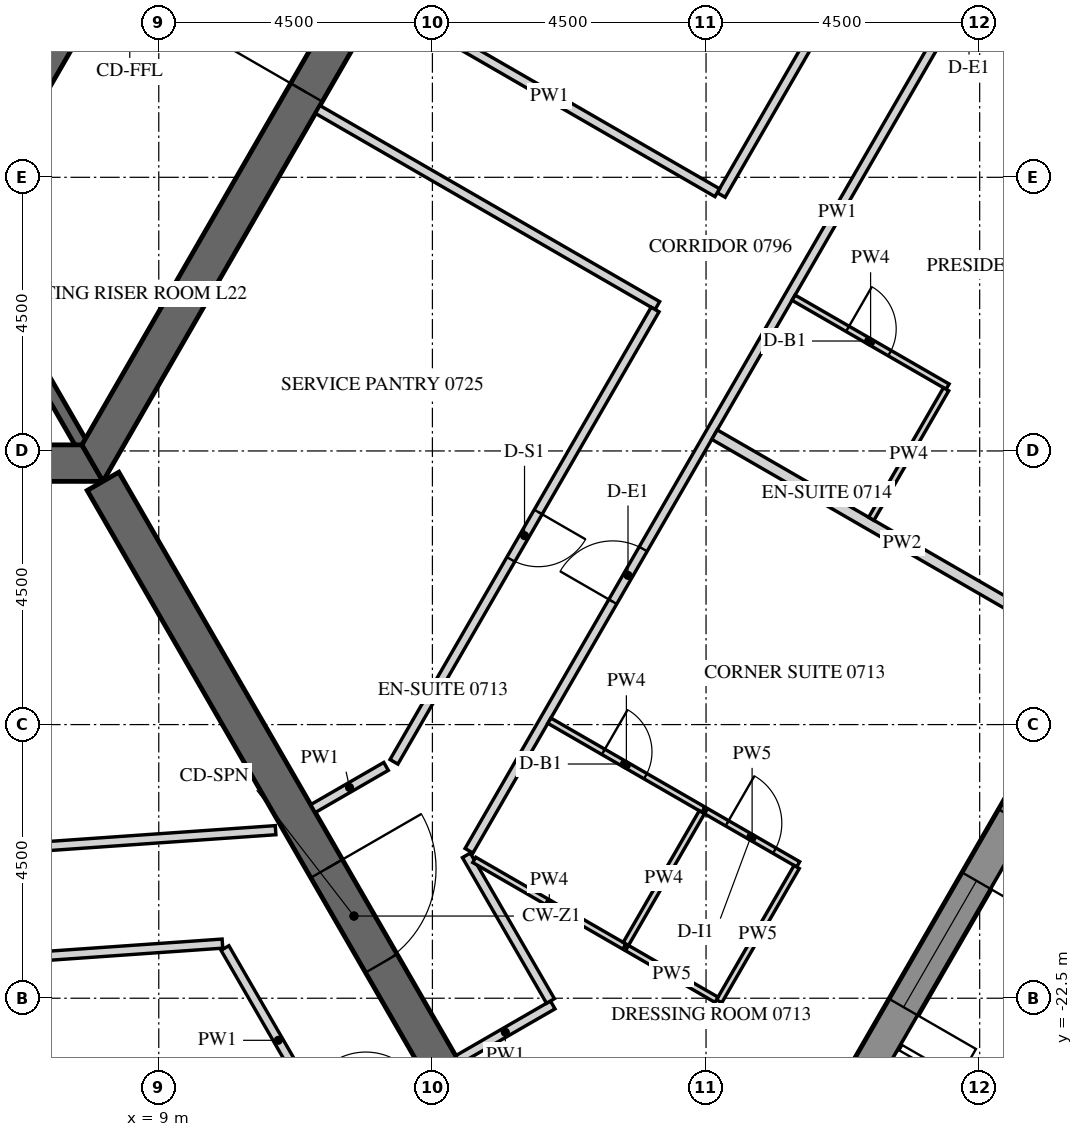
"""IFC4 building model, lengths in metres.
Left out: names, types, materials, properties, quantities, classifications, styles, units other than length and angle.
Written with IfcOpenShell. Run it as: python <this file> out.ifc"""

import sys

from ifc_helpers import new_model, si_unit, direction, frame, frame_2d, origin, place, context, subcontext, project, spatial, polyline, rectangle, outline, extrude, element, fill, save


model = new_model("IFC4")
c1 = context("Model", 3, precision=1e-05, world=origin(), true_north=direction((0.0, 1.0)))
c2 = subcontext(c1, "Body", "Model", "MODEL_VIEW")
j1 = project(units=[si_unit("LENGTHUNIT", "METRE"), si_unit("PLANEANGLEUNIT", "RADIAN")], contexts=[c1])
p1 = place(None, origin())
s1 = spatial("IfcSite", under=j1, at=p1, CompositionType="ELEMENT")
p2 = place(p1, origin())
s2 = spatial("IfcBuilding", under=s1, at=p2, CompositionType="ELEMENT")
p3 = place(p2, frame((0.0, 0.0, 99.9)))
s3 = spatial("IfcBuildingStorey", under=s2, at=p3, CompositionType="ELEMENT", Elevation=99.9)
p4 = place(p3, frame((18.83, -26.835, -0.15), z_axis=(0.0, 0.0, 1.0), x_axis=(0.500003800416, 0.866023209602, 0.0)))
e1 = element("IfcWall", 1, at=p4, inside=s3, PredefinedType="SOLIDWALL", context=c2, shape_type="SweptSolid", body=[
    extrude(outline(polyline([(-0.022, -0.275), (30.097, -0.275), (30.045, 0.275), (0.022, 0.275), (-0.022, -0.275)])), origin(), (0.0, 0.0, 1.0), 3.9),
])
p5 = place(p4, frame((1.236, 0.0, 1.05)))
e2 = element("IfcOpeningElement", 2, at=p5, cuts=e1, PredefinedType="OPENING", context=c2, shape_type="SweptSolid", body=[
    extrude(rectangle(XDim=2.4, YDim=2.4, at=frame_2d((1.2, 1.2))), frame((0.0, 0.285, 0.0), z_axis=(0.0, -1.0, 0.0), x_axis=(1.0, 0.0, 0.0)), (0.0, 0.0, 1.0), 0.57),
])
p6 = place(p4, frame((4.835, 0.0, 1.05)))
e3 = element("IfcOpeningElement", 3, at=p6, cuts=e1, PredefinedType="OPENING", context=c2, shape_type="SweptSolid", body=[
    extrude(rectangle(XDim=2.4, YDim=2.4, at=frame_2d((1.2, 1.2))), frame((0.0, 0.285, 0.0), z_axis=(0.0, -1.0, 0.0), x_axis=(1.0, 0.0, 0.0)), (0.0, 0.0, 1.0), 0.57),
])
p7 = place(p4, frame((8.436, 0.0, 1.05)))
e4 = element("IfcOpeningElement", 4, at=p7, cuts=e1, PredefinedType="OPENING", context=c2, shape_type="SweptSolid", body=[
    extrude(rectangle(XDim=2.4, YDim=2.4, at=frame_2d((1.2, 1.2))), frame((0.0, 0.285, 0.0), z_axis=(0.0, -1.0, 0.0), x_axis=(1.0, 0.0, 0.0)), (0.0, 0.0, 1.0), 0.57),
])
p8 = place(p4, frame((12.035, 0.0, 1.05)))
e5 = element("IfcOpeningElement", 5, at=p8, cuts=e1, PredefinedType="OPENING", context=c2, shape_type="SweptSolid", body=[
    extrude(rectangle(XDim=2.4, YDim=2.4, at=frame_2d((1.2, 1.2))), frame((0.0, 0.285, 0.0), z_axis=(0.0, -1.0, 0.0), x_axis=(1.0, 0.0, 0.0)), (0.0, 0.0, 1.0), 0.57),
])
p9 = place(p4, frame((15.635, 0.0, 1.05)))
e6 = element("IfcOpeningElement", 6, at=p9, cuts=e1, PredefinedType="OPENING", context=c2, shape_type="SweptSolid", body=[
    extrude(rectangle(XDim=2.4, YDim=2.4, at=frame_2d((1.2, 1.2))), frame((0.0, 0.285, 0.0), z_axis=(0.0, -1.0, 0.0), x_axis=(1.0, 0.0, 0.0)), (0.0, 0.0, 1.0), 0.57),
])
p10 = place(p4, frame((19.236, 0.0, 1.05)))
e7 = element("IfcOpeningElement", 7, at=p10, cuts=e1, PredefinedType="OPENING", context=c2, shape_type="SweptSolid", body=[
    extrude(rectangle(XDim=2.4, YDim=2.4, at=frame_2d((1.2, 1.2))), frame((0.0, 0.285, 0.0), z_axis=(0.0, -1.0, 0.0), x_axis=(1.0, 0.0, 0.0)), (0.0, 0.0, 1.0), 0.57),
])
p11 = place(p4, frame((22.835, 0.0, 1.05)))
e8 = element("IfcOpeningElement", 8, at=p11, cuts=e1, PredefinedType="OPENING", context=c2, shape_type="SweptSolid", body=[
    extrude(rectangle(XDim=2.4, YDim=2.4, at=frame_2d((1.2, 1.2))), frame((0.0, 0.285, 0.0), z_axis=(0.0, -1.0, 0.0), x_axis=(1.0, 0.0, 0.0)), (0.0, 0.0, 1.0), 0.57),
])
p12 = place(p4, frame((26.436, 0.0, 1.05)))
e9 = element("IfcOpeningElement", 9, at=p12, cuts=e1, PredefinedType="OPENING", context=c2, shape_type="SweptSolid", body=[
    extrude(rectangle(XDim=2.4, YDim=2.4, at=frame_2d((1.2, 1.2))), frame((0.0, 0.285, 0.0), z_axis=(0.0, -1.0, 0.0), x_axis=(1.0, 0.0, 0.0)), (0.0, 0.0, 1.0), 0.57),
])
p13 = place(p3, frame((-7.91, -13.7, -0.15), z_axis=(0.0, 0.0, 1.0), x_axis=(1.0, 0.0, 0.0)))
e10 = element("IfcWall", 10, at=p13, inside=s3, PredefinedType="SHEAR", context=c2, shape_type="SweptSolid", body=[
    extrude(outline(polyline([(-0.173, -0.3), (15.993, -0.3), (15.646, 0.3), (0.173, 0.3), (-0.173, -0.3)])), origin(), (0.0, 0.0, 1.0), 3.9),
])
p14 = place(p13, frame((7.31, 0.0, 0.15)))
e11 = element("IfcOpeningElement", 11, at=p14, cuts=e10, PredefinedType="OPENING", context=c2, shape_type="SweptSolid", body=[
    extrude(rectangle(XDim=1.2, YDim=2.4, at=frame_2d((0.6, 1.2))), frame((0.0, 0.31, 0.0), z_axis=(0.0, -1.0, 0.0), x_axis=(1.0, 0.0, 0.0)), (0.0, 0.0, 1.0), 0.62),
])
p15 = place(p3, frame((7.91, -13.7, -0.15), z_axis=(0.0, 0.0, 1.0), x_axis=(0.499999880136, 0.866025472988, 0.0)))
e12 = element("IfcWall", 12, at=p15, inside=s3, PredefinedType="SHEAR", context=c2, shape_type="SweptSolid", body=[
    extrude(outline(polyline([(-0.173, -0.3), (15.993, -0.3), (15.646, 0.3), (0.173, 0.3), (-0.173, -0.3)])), origin(), (0.0, 0.0, 1.0), 3.9),
])
p16 = place(p15, frame((7.039, 0.0, 0.15)))
e13 = element("IfcOpeningElement", 13, at=p16, cuts=e12, PredefinedType="OPENING", context=c2, shape_type="SweptSolid", body=[
    extrude(rectangle(XDim=1.8, YDim=2.4, at=frame_2d((0.9, 1.2))), frame((0.0, 0.31, 0.0), z_axis=(0.0, -1.0, 0.0), x_axis=(1.0, 0.0, 0.0)), (0.0, 0.0, 1.0), 0.62),
])
p17 = place(p3, frame((8.083, -14.0, -0.15), z_axis=(0.0, 0.0, 1.0), x_axis=(0.499997680643, -0.866026742862, 0.0)))
e14 = element("IfcWall", 14, at=p17, inside=s3, PredefinedType="SHEAR", context=c2, shape_type="SweptSolid", body=[
    extrude(rectangle(XDim=16.509, YDim=0.6, at=frame_2d((8.254, 0.0))), origin(), (0.0, 0.0, 1.0), 3.9),
])
p18 = place(p17, frame((7.354, 0.0, 0.15)))
e15 = element("IfcOpeningElement", 15, at=p18, cuts=e14, PredefinedType="OPENING", context=c2, shape_type="SweptSolid", body=[
    extrude(rectangle(XDim=1.8, YDim=2.4, at=frame_2d((0.9, 1.2))), frame((0.0, 0.31, 0.0), z_axis=(0.0, -1.0, 0.0), x_axis=(1.0, 0.0, 0.0)), (0.0, 0.0, 1.0), 0.62),
])
p19 = place(p3, frame((5.673, -9.825, -0.15), z_axis=(0.0, 0.0, 1.0), x_axis=(0.499995046907, 0.866028263435, 0.0)))
e16 = element("IfcWall", 16, at=p19, inside=s3, PredefinedType="SHEAR", context=c2, shape_type="SweptSolid", body=[
    extrude(outline(polyline([(-0.101, -0.175), (11.446, -0.175), (11.244, 0.175), (0.101, 0.175), (-0.101, -0.175)])), origin(), (0.0, 0.0, 1.0), 3.9),
])
p20 = place(p19, frame((4.801, 0.0, 0.15)))
e17 = element("IfcOpeningElement", 17, at=p20, cuts=e16, PredefinedType="OPENING", context=c2, shape_type="SweptSolid", body=[
    extrude(rectangle(XDim=1.8, YDim=2.4, at=frame_2d((0.9, 1.2))), frame((0.0, 0.185, 0.0), z_axis=(0.0, -1.0, 0.0), x_axis=(1.0, 0.0, 0.0)), (0.0, 0.0, 1.0), 0.37),
])
p21 = place(p3, frame((5.773, -10.0, -0.15), z_axis=(0.0, 0.0, 1.0), x_axis=(0.500038251005, -0.86600331843, 0.0)))
e18 = element("IfcWall", 18, at=p21, inside=s3, PredefinedType="SHEAR", context=c2, shape_type="SweptSolid", body=[
    extrude(rectangle(XDim=3.926, YDim=0.2, at=frame_2d((1.963, 0.0))), origin(), (0.0, 0.0, 1.0), 3.9),
])
p22 = place(p3, frame((-12.234, -23.16, 0.0), z_axis=(0.0, 0.0, 1.0), x_axis=(0.997563845372, 0.069759403714, 0.0)))
e19 = element("IfcWall", 19, at=p22, inside=s3, PredefinedType="PARTITIONING", context=c2, shape_type="SweptSolid", body=[
    extrude(rectangle(XDim=22.335, YDim=0.15, at=frame_2d((11.168, 0.0))), origin(), (0.0, 0.0, 1.0), 2.988),
])
p23 = place(p22, frame((5.409, 0.0, 0.0)))
e20 = element("IfcOpeningElement", 20, at=p23, cuts=e19, PredefinedType="OPENING", context=c2, shape_type="SweptSolid", body=[
    extrude(rectangle(XDim=1.0, YDim=2.1, at=frame_2d((0.5, 1.05))), frame((0.0, 0.085, 0.0), z_axis=(0.0, -1.0, 0.0), x_axis=(1.0, 0.0, 0.0)), (0.0, 0.0, 1.0), 0.17),
])
p24 = place(p22, frame((18.272, 0.0, 0.0)))
e21 = element("IfcOpeningElement", 21, at=p24, cuts=e19, PredefinedType="OPENING", context=c2, shape_type="SweptSolid", body=[
    extrude(rectangle(XDim=1.0, YDim=2.1, at=frame_2d((0.5, 1.05))), frame((0.0, 0.085, 0.0), z_axis=(0.0, -1.0, 0.0), x_axis=(1.0, 0.0, 0.0)), (0.0, 0.0, 1.0), 0.17),
])
p25 = place(p3, frame((10.089, -21.674, 0.0), z_axis=(0.0, 0.0, 1.0), x_axis=(0.500003763204, -0.866023231087, 0.0)))
e22 = element("IfcWall", 22, at=p25, inside=s3, PredefinedType="PARTITIONING", context=c2, shape_type="SweptSolid", body=[
    extrude(rectangle(XDim=3.506, YDim=0.15, at=frame_2d((1.753, 0.0))), origin(), (0.0, 0.0, 1.0), 2.988),
])
p26 = place(p3, frame((10.921, -19.736, 0.0), z_axis=(0.0, 0.0, 1.0), x_axis=(-0.997564418338, -0.069751209779, 0.0)))
e23 = element("IfcWall", 23, at=p26, inside=s3, PredefinedType="PARTITIONING", context=c2, shape_type="SweptSolid", body=[
    extrude(rectangle(XDim=10.196, YDim=0.15, at=frame_2d((5.098, 0.0))), origin(), (0.0, 0.0, 1.0), 2.988),
])
p27 = place(p26, frame((4.648, 0.0, 0.0)))
e24 = element("IfcOpeningElement", 24, at=p27, cuts=e23, PredefinedType="OPENING", context=c2, shape_type="SweptSolid", body=[
    extrude(rectangle(XDim=0.9, YDim=2.1, at=frame_2d((0.45, 1.05))), frame((0.0, 0.085, 0.0), z_axis=(0.0, -1.0, 0.0), x_axis=(1.0, 0.0, 0.0)), (0.0, 0.0, 1.0), 0.17),
])
p28 = place(p3, frame((13.92, -23.51, 0.0), z_axis=(0.0, 0.0, 1.0), x_axis=(0.866047807691, 0.499961193289, 0.0)))
e25 = element("IfcWall", 25, at=p28, inside=s3, PredefinedType="PARTITIONING", context=c2, shape_type="SweptSolid", body=[
    extrude(rectangle(XDim=1.8, YDim=0.15, at=frame_2d((0.9, 0.0))), origin(), (0.0, 0.0, 1.0), 2.988),
])
p29 = place(p3, frame((15.441, -22.545, 0.0), z_axis=(0.0, 0.0, 1.0), x_axis=(-0.499974611044, 0.866040061609, 0.0)))
e26 = element("IfcWall", 26, at=p29, inside=s3, PredefinedType="PARTITIONING", context=c2, shape_type="SweptSolid", body=[
    extrude(rectangle(XDim=2.766, YDim=0.15, at=frame_2d((1.383, 0.0))), origin(), (0.0, 0.0, 1.0), 2.988),
])
p30 = place(p3, frame((14.102, -20.075, 0.0), z_axis=(0.0, 0.0, 1.0), x_axis=(0.499996816197, 0.866027241946, 0.0)))
e27 = element("IfcWall", 27, at=p30, inside=s3, PredefinedType="PARTITIONING", context=c2, shape_type="SweptSolid", body=[
    extrude(rectangle(XDim=24.238, YDim=0.15, at=frame_2d((12.119, 0.0))), origin(), (0.0, 0.0, 1.0), 2.988),
])
p31 = place(p30, frame((4.729, 0.0, 0.0)))
e28 = element("IfcOpeningElement", 28, at=p31, cuts=e27, PredefinedType="OPENING", context=c2, shape_type="SweptSolid", body=[
    extrude(rectangle(XDim=1.0, YDim=2.1, at=frame_2d((0.5, 1.05))), frame((0.0, 0.085, 0.0), z_axis=(0.0, -1.0, 0.0), x_axis=(1.0, 0.0, 0.0)), (0.0, 0.0, 1.0), 0.17),
])
p32 = place(p30, frame((15.946, 0.0, 0.0)))
e29 = element("IfcOpeningElement", 29, at=p32, cuts=e27, PredefinedType="OPENING", context=c2, shape_type="SweptSolid", body=[
    extrude(rectangle(XDim=1.0, YDim=2.1, at=frame_2d((0.5, 1.05))), frame((0.0, 0.085, 0.0), z_axis=(0.0, -1.0, 0.0), x_axis=(1.0, 0.0, 0.0)), (0.0, 0.0, 1.0), 0.17),
])
p33 = place(p3, frame((24.058, 0.769, 0.0), z_axis=(0.0, 0.0, 1.0), x_axis=(-0.499995346943, -0.866028090212, 0.0)))
e30 = element("IfcWall", 30, at=p33, inside=s3, PredefinedType="PARTITIONING", context=c2, shape_type="SweptSolid", body=[
    extrude(rectangle(XDim=11.616, YDim=0.15, at=frame_2d((5.808, 0.0))), origin(), (0.0, 0.0, 1.0), 2.988),
])
p34 = place(p33, frame((5.358, 0.0, 0.0)))
e31 = element("IfcOpeningElement", 31, at=p34, cuts=e30, PredefinedType="OPENING", context=c2, shape_type="SweptSolid", body=[
    extrude(rectangle(XDim=0.9, YDim=2.1, at=frame_2d((0.45, 1.05))), frame((0.0, 0.085, 0.0), z_axis=(0.0, -1.0, 0.0), x_axis=(1.0, 0.0, 0.0)), (0.0, 0.0, 1.0), 0.17),
])
p35 = place(p3, frame((18.185, -9.253, 0.0), z_axis=(0.0, 0.0, 1.0), x_axis=(-0.866028703517, 0.499994284652, 0.0)))
e32 = element("IfcWall", 32, at=p35, inside=s3, PredefinedType="PARTITIONING", context=c2, shape_type="SweptSolid", body=[
    extrude(rectangle(XDim=6.375, YDim=0.15, at=frame_2d((3.188, 0.0))), origin(), (0.0, 0.0, 1.0), 2.988),
])
p36 = place(p3, frame((11.614, -7.884, 0.0), z_axis=(0.0, 0.0, 1.0), x_axis=(0.866021702275, -0.500006411147, 0.0)))
e33 = element("IfcWall", 33, at=p36, inside=s3, PredefinedType="PARTITIONING", context=c2, shape_type="SweptSolid", body=[
    extrude(rectangle(XDim=6.45, YDim=0.15, at=frame_2d((3.225, 0.0))), origin(), (0.0, 0.0, 1.0), 2.988),
])
p37 = place(p3, frame((17.162, -11.174, 0.0), z_axis=(0.0, 0.0, 1.0), x_axis=(-0.499997214665, -0.866027011893, 0.0)))
e34 = element("IfcWall", 34, at=p37, inside=s3, PredefinedType="PARTITIONING", context=c2, shape_type="SweptSolid", body=[
    extrude(rectangle(XDim=8.589, YDim=0.15, at=frame_2d((4.294, 0.0))), origin(), (0.0, 0.0, 1.0), 2.988),
])
p38 = place(p37, frame((3.844, 0.0, 0.0)))
e35 = element("IfcOpeningElement", 35, at=p38, cuts=e34, PredefinedType="OPENING", context=c2, shape_type="SweptSolid", body=[
    extrude(rectangle(XDim=0.9, YDim=2.1, at=frame_2d((0.45, 1.05))), frame((0.0, 0.085, 0.0), z_axis=(0.0, -1.0, 0.0), x_axis=(1.0, 0.0, 0.0)), (0.0, 0.0, 1.0), 0.17),
])
p39 = place(p3, frame((12.738, -18.688, 0.0), z_axis=(0.0, 0.0, 1.0), x_axis=(-0.866080107329, -0.499905238708, 0.0)))
e36 = element("IfcWall", 36, at=p39, inside=s3, PredefinedType="PARTITIONING", context=c2, shape_type="SweptSolid", body=[
    extrude(rectangle(XDim=1.387, YDim=0.15, at=frame_2d((0.694, 0.0))), origin(), (0.0, 0.0, 1.0), 2.988),
])
p40 = place(p3, frame((16.656, -21.65, 0.0), z_axis=(0.0, 0.0, 1.0), x_axis=(-0.866041498374, 0.499972122318, 0.0)))
e37 = element("IfcWall", 37, at=p40, inside=s3, PredefinedType="PARTITIONING", context=c2, shape_type="SweptSolid", body=[
    extrude(rectangle(XDim=2.85, YDim=0.1, at=frame_2d((1.425, 0.0))), origin(), (0.0, 0.0, 1.0), 2.988),
])
p41 = place(p3, frame((15.423, -17.936, 0.0), z_axis=(0.0, 0.0, 1.0), x_axis=(0.86601045545, -0.500025890382, 0.0)))
e38 = element("IfcWall", 38, at=p41, inside=s3, PredefinedType="PARTITIONING", context=c2, shape_type="SweptSolid", body=[
    extrude(rectangle(XDim=2.925, YDim=0.1, at=frame_2d((1.462, 0.0))), origin(), (0.0, 0.0, 1.0), 2.988),
])
p42 = place(p41, frame((1.025, 0.0, 0.0)))
e39 = element("IfcOpeningElement", 39, at=p42, cuts=e38, PredefinedType="OPENING", context=c2, shape_type="SweptSolid", body=[
    extrude(rectangle(XDim=0.8, YDim=2.1, at=frame_2d((0.4, 1.05))), frame((0.0, 0.06, 0.0), z_axis=(0.0, -1.0, 0.0), x_axis=(1.0, 0.0, 0.0)), (0.0, 0.0, 1.0), 0.12),
])
p43 = place(p3, frame((18.0, -19.423, 0.0), z_axis=(0.0, 0.0, 1.0), x_axis=(0.866036909293, -0.499980071345, 0.0)))
e40 = element("IfcWall", 40, at=p43, inside=s3, PredefinedType="PARTITIONING", context=c2, shape_type="SweptSolid", body=[
    extrude(rectangle(XDim=1.75, YDim=0.1, at=frame_2d((0.875, 0.0))), origin(), (0.0, 0.0, 1.0), 2.988),
])
p44 = place(p43, frame((0.4, 0.0, 0.0)))
e41 = element("IfcOpeningElement", 41, at=p44, cuts=e40, PredefinedType="OPENING", context=c2, shape_type="SweptSolid", body=[
    extrude(rectangle(XDim=0.9, YDim=2.1, at=frame_2d((0.45, 1.05))), frame((0.0, 0.06, 0.0), z_axis=(0.0, -1.0, 0.0), x_axis=(1.0, 0.0, 0.0)), (0.0, 0.0, 1.0), 0.12),
])
p45 = place(p3, frame((19.49, -20.342, 0.0), z_axis=(0.0, 0.0, 1.0), x_axis=(-0.500020783669, -0.866013403995, 0.0)))
e42 = element("IfcWall", 42, at=p45, inside=s3, PredefinedType="PARTITIONING", context=c2, shape_type="SweptSolid", body=[
    extrude(rectangle(XDim=2.55, YDim=0.1, at=frame_2d((1.275, 0.0))), origin(), (0.0, 0.0, 1.0), 2.988),
])
p46 = place(p3, frame((18.172, -22.525, 0.0), z_axis=(0.0, 0.0, 1.0), x_axis=(-0.86605165483, 0.499954529098, 0.0)))
e43 = element("IfcWall", 43, at=p46, inside=s3, PredefinedType="PARTITIONING", context=c2, shape_type="SweptSolid", body=[
    extrude(rectangle(XDim=1.7, YDim=0.1, at=frame_2d((0.85, 0.0))), origin(), (0.0, 0.0, 1.0), 2.988),
])
p47 = place(p3, frame((24.31, -16.794, 0.0), z_axis=(0.0, 0.0, 1.0), x_axis=(-0.866024672353, 0.500001266874, 0.0)))
e44 = element("IfcWall", 44, at=p47, inside=s3, PredefinedType="PARTITIONING", context=c2, shape_type="SweptSolid", body=[
    extrude(rectangle(XDim=7.125, YDim=0.18, at=frame_2d((3.562, 0.0))), origin(), (0.0, 0.0, 1.0), 2.988),
])
p48 = place(p3, frame((16.682, -21.607, 0.0), z_axis=(0.0, 0.0, 1.0), x_axis=(0.500004234368, 0.866022959057, 0.0)))
e45 = element("IfcWall", 45, at=p48, inside=s3, PredefinedType="PARTITIONING", context=c2, shape_type="SweptSolid", body=[
    extrude(rectangle(XDim=2.5, YDim=0.1, at=frame_2d((1.25, 0.0))), origin(), (0.0, 0.0, 1.0), 2.988),
])
p49 = place(p3, frame((19.439, -10.98, 0.0), z_axis=(0.0, 0.0, 1.0), x_axis=(0.866046596414, -0.499963291492, 0.0)))
e46 = element("IfcWall", 46, at=p49, inside=s3, PredefinedType="PARTITIONING", context=c2, shape_type="SweptSolid", body=[
    extrude(rectangle(XDim=2.925, YDim=0.1, at=frame_2d((1.462, 0.0))), origin(), (0.0, 0.0, 1.0), 2.988),
])
p50 = place(p49, frame((1.025, 0.0, 0.0)))
e47 = element("IfcOpeningElement", 47, at=p50, cuts=e46, PredefinedType="OPENING", context=c2, shape_type="SweptSolid", body=[
    extrude(rectangle(XDim=0.8, YDim=2.1, at=frame_2d((0.4, 1.05))), frame((0.0, 0.06, 0.0), z_axis=(0.0, -1.0, 0.0), x_axis=(1.0, 0.0, 0.0)), (0.0, 0.0, 1.0), 0.12),
])
p51 = place(p3, frame((21.948, -12.486, 0.0), z_axis=(0.0, 0.0, 1.0), x_axis=(-0.500003092839, -0.866023618125, 0.0)))
e48 = element("IfcWall", 48, at=p51, inside=s3, PredefinedType="PARTITIONING", context=c2, shape_type="SweptSolid", body=[
    extrude(rectangle(XDim=2.46, YDim=0.1, at=frame_2d((1.23, 0.0))), origin(), (0.0, 0.0, 1.0), 2.988),
])
p52 = place(p6, frame((0.0, 0.205, 0.0)))
e49 = element("IfcWindow", 49, at=p52, inside=s3, PartitioningType="DOUBLE_PANEL_VERTICAL", PredefinedType="WINDOW", context=c2, shape_type="SweptSolid", body=[
    extrude(rectangle(XDim=2.4, YDim=2.4, at=frame_2d((1.2, 1.2))), frame((0.0, 0.03, 0.0), z_axis=(0.0, -1.0, 0.0), x_axis=(1.0, 0.0, 0.0)), (0.0, 0.0, 1.0), 0.06),
])
fill(e3, e49)
p53 = place(p7, frame((0.0, 0.205, 0.0)))
e50 = element("IfcWindow", 50, at=p53, inside=s3, PartitioningType="DOUBLE_PANEL_VERTICAL", PredefinedType="WINDOW", context=c2, shape_type="SweptSolid", body=[
    extrude(rectangle(XDim=2.4, YDim=2.4, at=frame_2d((1.2, 1.2))), frame((0.0, 0.03, 0.0), z_axis=(0.0, -1.0, 0.0), x_axis=(1.0, 0.0, 0.0)), (0.0, 0.0, 1.0), 0.06),
])
fill(e4, e50)
p54 = place(p16, origin())
e51 = element("IfcDoor", 51, at=p54, inside=s3, OperationType="DOUBLE_DOOR_SINGLE_SWING", PredefinedType="DOOR", context=c2, shape_type="SweptSolid", body=[
    extrude(rectangle(XDim=1.8, YDim=2.4, at=frame_2d((0.9, 1.2))), frame((0.0, 0.025, 0.0), z_axis=(0.0, -1.0, 0.0), x_axis=(1.0, 0.0, 0.0)), (0.0, 0.0, 1.0), 0.05),
])
fill(e13, e51)
p55 = place(p18, origin())
e52 = element("IfcDoor", 52, at=p55, inside=s3, OperationType="DOUBLE_DOOR_SINGLE_SWING", PredefinedType="DOOR", context=c2, shape_type="SweptSolid", body=[
    extrude(rectangle(XDim=1.8, YDim=2.4, at=frame_2d((0.9, 1.2))), frame((0.0, 0.025, 0.0), z_axis=(0.0, -1.0, 0.0), x_axis=(1.0, 0.0, 0.0)), (0.0, 0.0, 1.0), 0.05),
])
fill(e15, e52)
p56 = place(p31, origin())
e53 = element("IfcDoor", 53, at=p56, inside=s3, OperationType="SINGLE_SWING_LEFT", PredefinedType="DOOR", context=c2, shape_type="SweptSolid", body=[
    extrude(rectangle(XDim=1.0, YDim=2.1, at=frame_2d((0.5, 1.05))), frame((0.0, 0.025, 0.0), z_axis=(0.0, -1.0, 0.0), x_axis=(1.0, 0.0, 0.0)), (0.0, 0.0, 1.0), 0.05),
])
fill(e28, e53)
p57 = place(p42, origin())
e54 = element("IfcDoor", 54, at=p57, inside=s3, OperationType="SINGLE_SWING_RIGHT", PredefinedType="DOOR", context=c2, shape_type="SweptSolid", body=[
    extrude(rectangle(XDim=0.8, YDim=2.1, at=frame_2d((0.4, 1.05))), frame((0.0, 0.025, 0.0), z_axis=(0.0, -1.0, 0.0), x_axis=(1.0, 0.0, 0.0)), (0.0, 0.0, 1.0), 0.05),
])
fill(e39, e54)
p58 = place(p44, origin())
e55 = element("IfcDoor", 55, at=p58, inside=s3, OperationType="SINGLE_SWING_RIGHT", PredefinedType="DOOR", context=c2, shape_type="SweptSolid", body=[
    extrude(rectangle(XDim=0.9, YDim=2.1, at=frame_2d((0.45, 1.05))), frame((0.0, 0.025, 0.0), z_axis=(0.0, -1.0, 0.0), x_axis=(1.0, 0.0, 0.0)), (0.0, 0.0, 1.0), 0.05),
])
fill(e41, e55)
p59 = place(p50, origin())
e56 = element("IfcDoor", 56, at=p59, inside=s3, OperationType="SINGLE_SWING_RIGHT", PredefinedType="DOOR", context=c2, shape_type="SweptSolid", body=[
    extrude(rectangle(XDim=0.8, YDim=2.1, at=frame_2d((0.4, 1.05))), frame((0.0, 0.025, 0.0), z_axis=(0.0, -1.0, 0.0), x_axis=(1.0, 0.0, 0.0)), (0.0, 0.0, 1.0), 0.05),
])
fill(e47, e56)
p60 = place(p38, origin())
e57 = element("IfcDoor", 57, at=p60, inside=s3, OperationType="SINGLE_SWING_LEFT", PredefinedType="DOOR", context=c2, shape_type="SweptSolid", body=[
    extrude(rectangle(XDim=0.9, YDim=2.1, at=frame_2d((0.45, 1.05))), frame((0.0, 0.025, 0.0), z_axis=(0.0, -1.0, 0.0), x_axis=(1.0, 0.0, 0.0)), (0.0, 0.0, 1.0), 0.05),
])
fill(e35, e57)
save(model, sys.argv[1])
